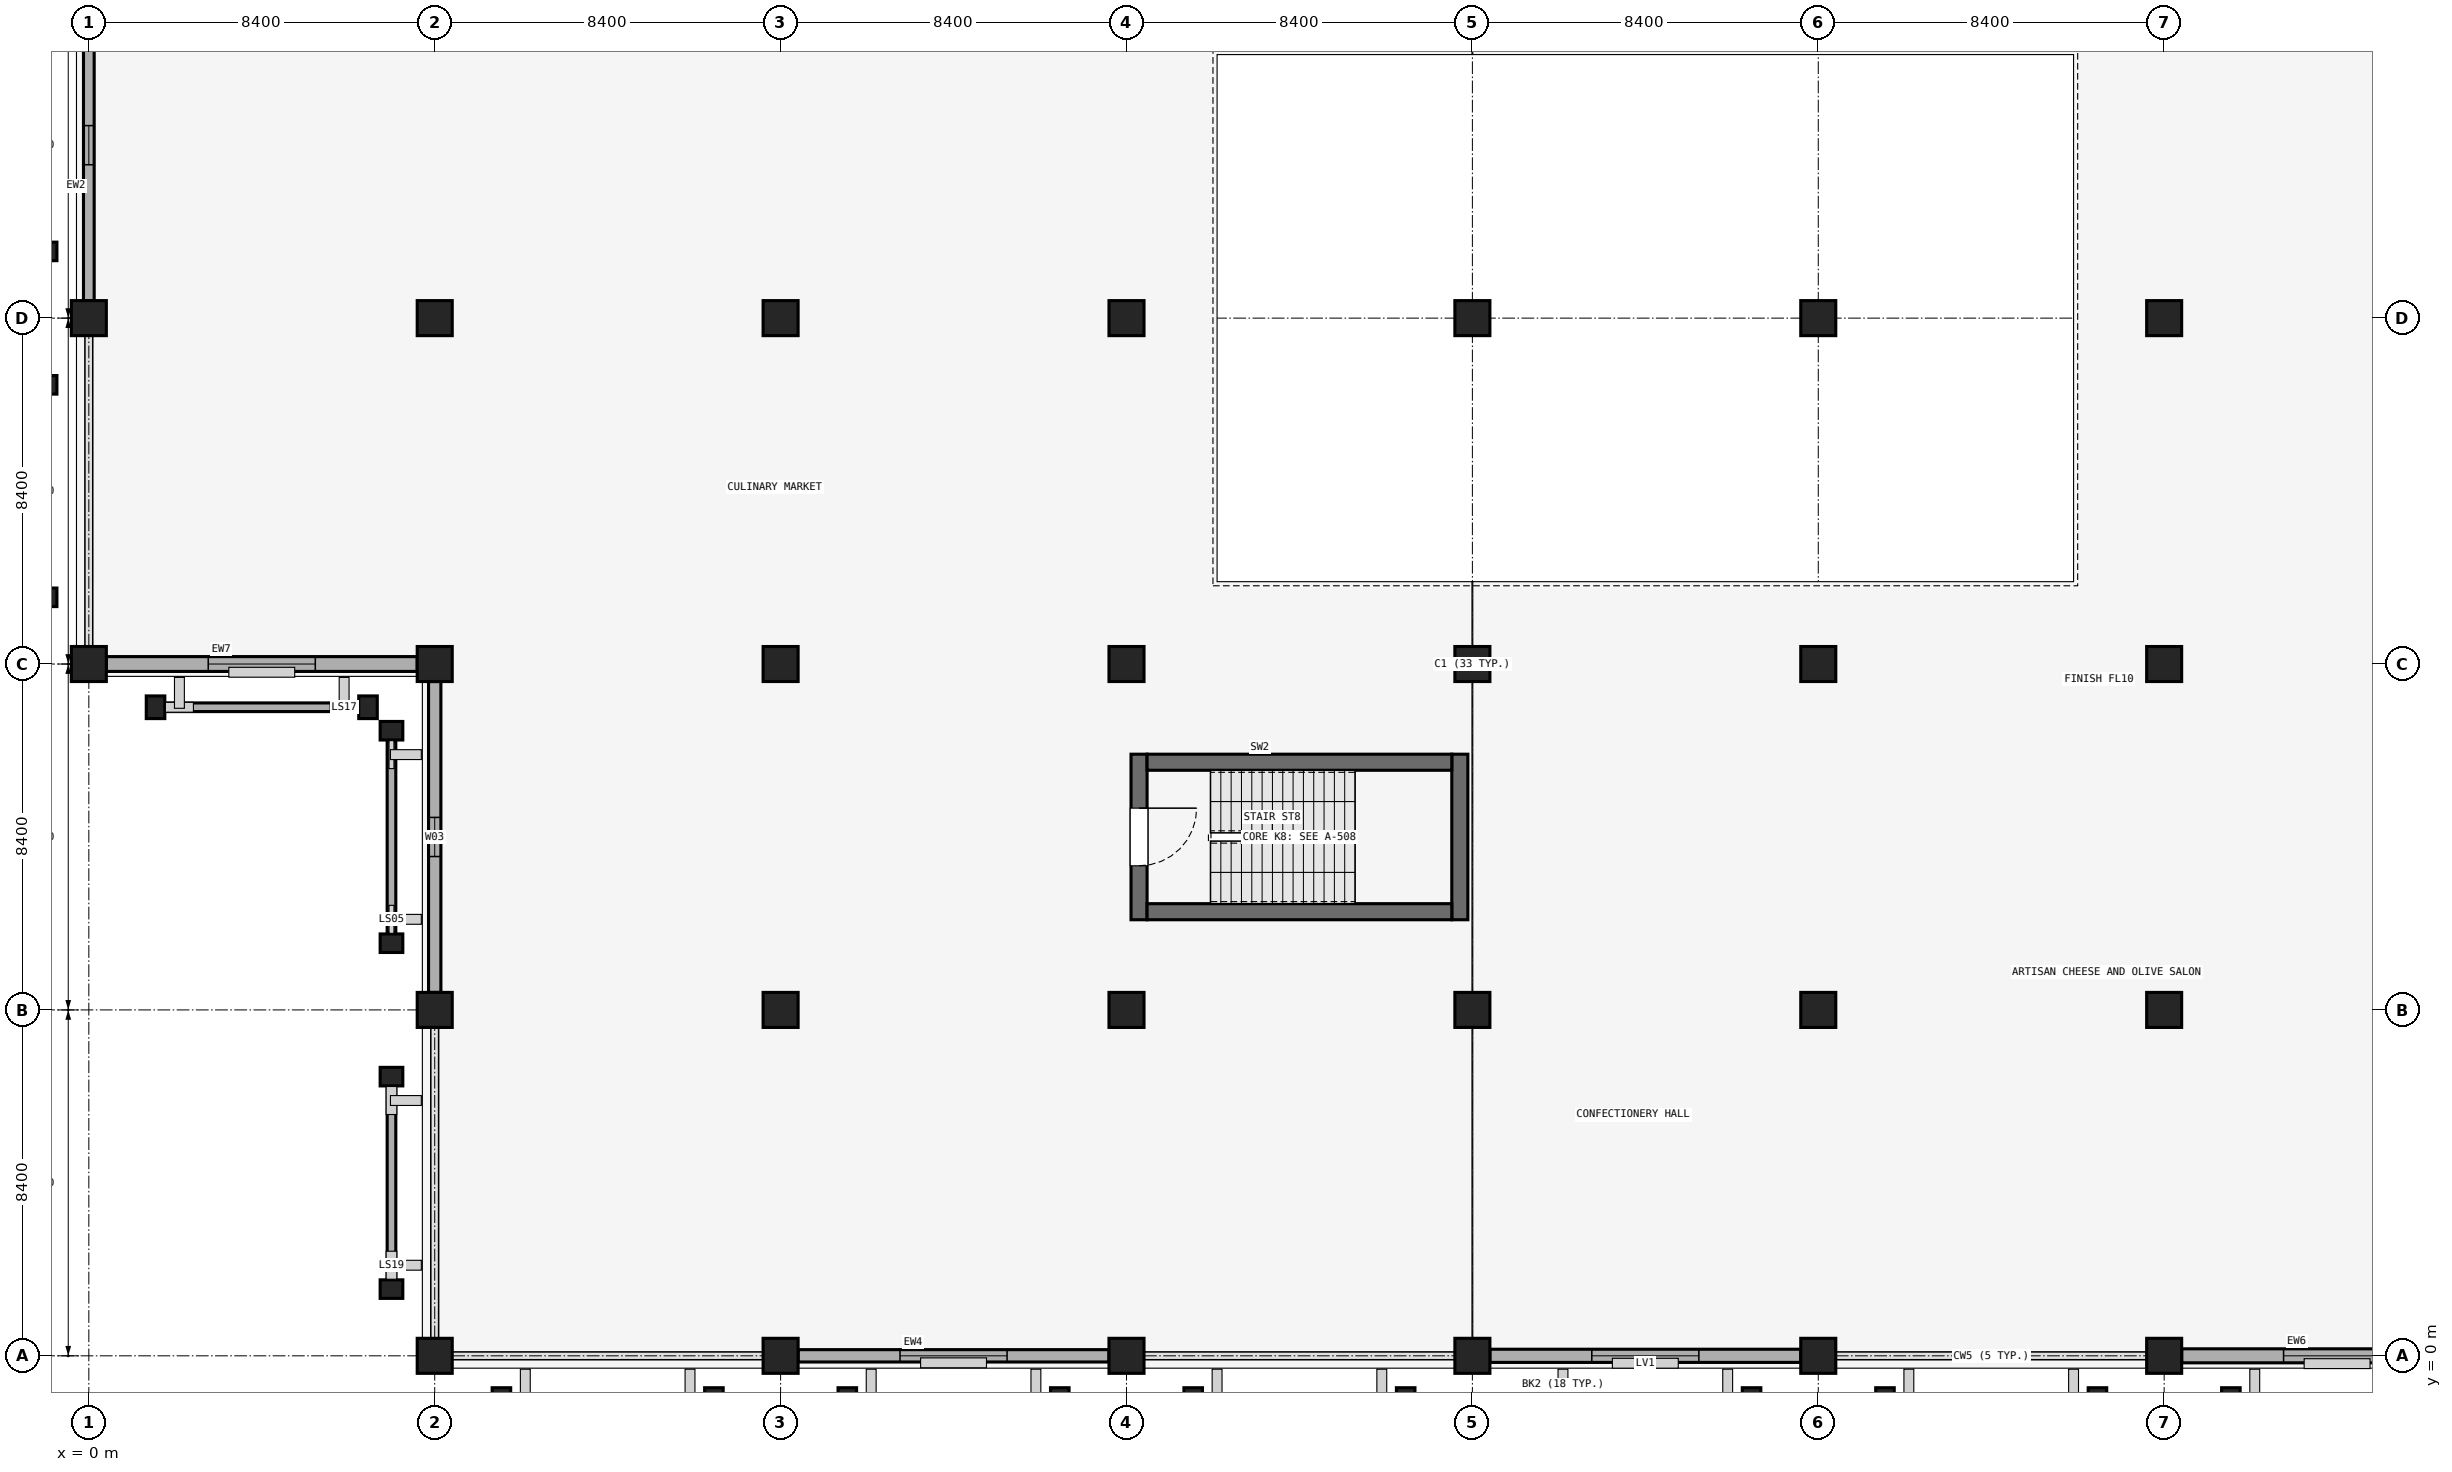
"""IFC4 building model, lengths in metres.
Left out: names, types, materials, properties, quantities, classifications, styles, units other than length and angle.
Written with IfcOpenShell. Run it as: python <this file> out.ifc"""

import sys

from ifc_helpers import new_model, si_unit, direction, frame, frame_2d, origin, origin_2d, place, context, subcontext, project, spatial, rectangle, extrude, element, fill, save


model = new_model("IFC4")
c1 = context("Model", 3, precision=1e-05, world=origin(), true_north=direction((0.0, 1.0)))
c2 = subcontext(c1, "Body", "Model", "MODEL_VIEW")
j1 = project(units=[si_unit("LENGTHUNIT", "METRE"), si_unit("PLANEANGLEUNIT", "RADIAN")], contexts=[c1])
p1 = place(None, origin())
s1 = spatial("IfcSite", under=j1, at=p1, CompositionType="ELEMENT")
p2 = place(p1, origin())
s2 = spatial("IfcBuilding", under=s1, at=p2, CompositionType="ELEMENT")
p3 = place(p2, frame((0.0, 0.0, 5.4)))
s3 = spatial("IfcBuildingStorey", under=s2, at=p3, CompositionType="ELEMENT", Elevation=5.4)
for number, where, z_axis, x_axis in (
    (1, (8.4, 0.0, 0.0), (0.0, 0.0, 1.0), (1.0, 0.0, 0.0)),
    (2, (16.8, 0.0, 0.0), (0.0, 0.0, 1.0), (1.0, 0.0, 0.0)),
    (3, (25.2, 0.0, 0.0), (0.0, 0.0, 1.0), (1.0, 0.0, 0.0)),
    (4, (33.6, 0.0, 0.0), (0.0, 0.0, 1.0), (1.0, 0.0, 0.0)),
    (5, (42.0, 0.0, 0.0), (0.0, 0.0, 1.0), (1.0, 0.0, 0.0)),
    (6, (50.4, 0.0, 0.0), (0.0, 0.0, 1.0), (1.0, 0.0, 0.0)),
    (7, (8.4, 8.4, 0.0), (0.0, 0.0, 1.0), (1.0, 0.0, 0.0)),
    (8, (16.8, 8.4, 0.0), (0.0, 0.0, 1.0), (1.0, 0.0, 0.0)),
    (9, (25.2, 8.4, 0.0), (0.0, 0.0, 1.0), (1.0, 0.0, 0.0)),
    (10, (33.6, 8.4, 0.0), (0.0, 0.0, 1.0), (1.0, 0.0, 0.0)),
    (11, (42.0, 8.4, 0.0), (0.0, 0.0, 1.0), (1.0, 0.0, 0.0)),
    (12, (50.4, 8.4, 0.0), (0.0, 0.0, 1.0), (1.0, 0.0, 0.0)),
    (13, (0.0, 16.8, 0.0), (0.0, 0.0, 1.0), (1.0, 0.0, 0.0)),
    (14, (8.4, 16.8, 0.0), (0.0, 0.0, 1.0), (1.0, 0.0, 0.0)),
    (15, (16.8, 16.8, 0.0), (0.0, 0.0, 1.0), (1.0, 0.0, 0.0)),
    (16, (25.2, 16.8, 0.0), (0.0, 0.0, 1.0), (1.0, 0.0, 0.0)),
    (17, (33.6, 16.8, 0.0), (0.0, 0.0, 1.0), (1.0, 0.0, 0.0)),
    (18, (42.0, 16.8, 0.0), (0.0, 0.0, 1.0), (1.0, 0.0, 0.0)),
    (19, (50.4, 16.8, 0.0), (0.0, 0.0, 1.0), (1.0, 0.0, 0.0)),
    (20, (0.0, 25.2, 0.0), (0.0, 0.0, 1.0), (1.0, 0.0, 0.0)),
    (21, (8.4, 25.2, 0.0), (0.0, 0.0, 1.0), (1.0, 0.0, 0.0)),
    (22, (16.8, 25.2, 0.0), (0.0, 0.0, 1.0), (1.0, 0.0, 0.0)),
    (23, (25.2, 25.2, 0.0), (0.0, 0.0, 1.0), (1.0, 0.0, 0.0)),
    (24, (33.6, 25.2, 0.0), (0.0, 0.0, 1.0), (1.0, 0.0, 0.0)),
    (25, (42.0, 25.2, 0.0), (0.0, 0.0, 1.0), (1.0, 0.0, 0.0)),
    (26, (50.4, 25.2, 0.0), (0.0, 0.0, 1.0), (1.0, 0.0, 0.0)),
):
    element("IfcColumn", number, at=place(p3, frame(where, z_axis=z_axis, x_axis=x_axis)), inside=s3, PredefinedType="COLUMN", context=c2, shape_type="SweptSolid", body=[
        extrude(rectangle(XDim=0.85, YDim=0.85, at=origin_2d()), origin(), (0.0, 0.0, 1.0), 4.5),
    ])
for number, where, z_axis, x_axis in (
    (27, (1.62, 15.75, 0.0), (0.0, 0.0, 1.0), (1.0, 0.0, 0.0)),
    (28, (6.78, 15.75, 0.0), (0.0, 0.0, 1.0), (1.0, 0.0, 0.0)),
    (29, (10.02, -1.05, 0.0), (0.0, 0.0, 1.0), (1.0, 0.0, 0.0)),
    (30, (15.18, -1.05, 0.0), (0.0, 0.0, 1.0), (1.0, 0.0, 0.0)),
    (31, (18.42, -1.05, 0.0), (0.0, 0.0, 1.0), (1.0, 0.0, 0.0)),
    (32, (23.58, -1.05, 0.0), (0.0, 0.0, 1.0), (1.0, 0.0, 0.0)),
    (33, (26.82, -1.05, 0.0), (0.0, 0.0, 1.0), (1.0, 0.0, 0.0)),
    (34, (31.98, -1.05, 0.0), (0.0, 0.0, 1.0), (1.0, 0.0, 0.0)),
    (35, (35.22, -1.05, 0.0), (0.0, 0.0, 1.0), (1.0, 0.0, 0.0)),
    (36, (40.38, -1.05, 0.0), (0.0, 0.0, 1.0), (1.0, 0.0, 0.0)),
    (37, (43.62, -1.05, 0.0), (0.0, 0.0, 1.0), (1.0, 0.0, 0.0)),
    (38, (48.78, -1.05, 0.0), (0.0, 0.0, 1.0), (1.0, 0.0, 0.0)),
    (39, (52.02, -1.05, 0.0), (0.0, 0.0, 1.0), (1.0, 0.0, 0.0)),
    (40, (-1.05, 18.42, 0.0), (0.0, 0.0, 1.0), (0.0, 1.0, 0.0)),
    (41, (-1.05, 23.58, 0.0), (0.0, 0.0, 1.0), (0.0, 1.0, 0.0)),
    (42, (-1.05, 26.82, 0.0), (0.0, 0.0, 1.0), (0.0, 1.0, 0.0)),
    (43, (7.35, 1.62, 0.0), (0.0, 0.0, 1.0), (0.0, 1.0, 0.0)),
    (44, (7.35, 6.78, 0.0), (0.0, 0.0, 1.0), (0.0, 1.0, 0.0)),
    (45, (7.35, 10.02, 0.0), (0.0, 0.0, 1.0), (0.0, 1.0, 0.0)),
    (46, (7.35, 15.18, 0.0), (0.0, 0.0, 1.0), (0.0, 1.0, 0.0)),
):
    element("IfcColumn", number, at=place(p3, frame(where, z_axis=z_axis, x_axis=x_axis)), inside=s3, PredefinedType="PILASTER", context=c2, shape_type="SweptSolid", body=[
        extrude(rectangle(XDim=0.45, YDim=0.55, at=origin_2d()), origin(), (0.0, 0.0, 1.0), 4.5),
    ])
p4 = place(p3, frame((17.225, 0.0, 0.0), z_axis=(0.0, 0.0, 1.0), x_axis=(1.0, 0.0, 0.0)))
e47 = element("IfcWall", 47, at=p4, inside=s3, PredefinedType="SOLIDWALL", context=c2, shape_type="SweptSolid", body=[
    extrude(rectangle(XDim=7.55, YDim=0.3, at=frame_2d((3.775, 0.0))), origin(), (0.0, 0.0, 1.0), 3.43),
])
p5 = place(p4, frame((2.475, 0.0, 0.95)))
e48 = element("IfcOpeningElement", 48, at=p5, cuts=e47, PredefinedType="OPENING", context=c2, shape_type="SweptSolid", body=[
    extrude(rectangle(XDim=2.6, YDim=1.35, at=frame_2d((1.3, 0.675))), frame((0.0, 0.16, 0.0), z_axis=(0.0, -1.0, 0.0), x_axis=(1.0, 0.0, 0.0)), (0.0, 0.0, 1.0), 0.32),
])
p6 = place(p3, frame((34.025, 0.0, 0.0), z_axis=(0.0, 0.0, 1.0), x_axis=(1.0, 0.0, 0.0)))
e49 = element("IfcWall", 49, at=p6, inside=s3, PredefinedType="SOLIDWALL", context=c2, shape_type="SweptSolid", body=[
    extrude(rectangle(XDim=7.55, YDim=0.32, at=frame_2d((3.775, 0.0))), origin(), (0.0, 0.0, 1.0), 3.43),
])
p7 = place(p6, frame((2.475, 0.0, 0.95)))
e50 = element("IfcOpeningElement", 50, at=p7, cuts=e49, PredefinedType="OPENING", context=c2, shape_type="SweptSolid", body=[
    extrude(rectangle(XDim=2.6, YDim=1.6, at=frame_2d((1.3, 0.8))), frame((0.0, 0.17, 0.0), z_axis=(0.0, -1.0, 0.0), x_axis=(1.0, 0.0, 0.0)), (0.0, 0.0, 1.0), 0.34),
])
p8 = place(p3, frame((50.825, 0.0, 0.0), z_axis=(0.0, 0.0, 1.0), x_axis=(1.0, 0.0, 0.0)))
e51 = element("IfcWall", 51, at=p8, inside=s3, PredefinedType="SOLIDWALL", context=c2, shape_type="SweptSolid", body=[
    extrude(rectangle(XDim=7.55, YDim=0.34, at=frame_2d((3.775, 0.0))), origin(), (0.0, 0.0, 1.0), 3.43),
])
p9 = place(p8, frame((2.475, 0.0, 0.95)))
e52 = element("IfcOpeningElement", 52, at=p9, cuts=e51, PredefinedType="OPENING", context=c2, shape_type="SweptSolid", body=[
    extrude(rectangle(XDim=2.6, YDim=1.85, at=frame_2d((1.3, 0.925))), frame((0.0, 0.18, 0.0), z_axis=(0.0, -1.0, 0.0), x_axis=(1.0, 0.0, 0.0)), (0.0, 0.0, 1.0), 0.36),
])
p10 = place(p3, frame((0.425, 16.8, 0.0), z_axis=(0.0, 0.0, 1.0), x_axis=(1.0, 0.0, 0.0)))
e53 = element("IfcWall", 53, at=p10, inside=s3, PredefinedType="SOLIDWALL", context=c2, shape_type="SweptSolid", body=[
    extrude(rectangle(XDim=7.55, YDim=0.36, at=frame_2d((3.775, 0.0))), origin(), (0.0, 0.0, 1.0), 3.43),
])
p11 = place(p10, frame((2.475, 0.0, 0.95)))
e54 = element("IfcOpeningElement", 54, at=p11, cuts=e53, PredefinedType="OPENING", context=c2, shape_type="SweptSolid", body=[
    extrude(rectangle(XDim=2.6, YDim=2.1, at=frame_2d((1.3, 1.05))), frame((0.0, 0.19, 0.0), z_axis=(0.0, -1.0, 0.0), x_axis=(1.0, 0.0, 0.0)), (0.0, 0.0, 1.0), 0.38),
])
p12 = place(p3, frame((0.0, 25.625, 0.0), z_axis=(0.0, 0.0, 1.0), x_axis=(0.0, 1.0, 0.0)))
e55 = element("IfcWall", 55, at=p12, inside=s3, PredefinedType="SOLIDWALL", context=c2, shape_type="SweptSolid", body=[
    extrude(rectangle(XDim=7.55, YDim=0.26, at=frame_2d((3.775, 0.0))), origin(), (0.0, 0.0, 1.0), 3.43),
])
p13 = place(p12, frame((3.3, 0.0, 0.95)))
e56 = element("IfcOpeningElement", 56, at=p13, cuts=e55, PredefinedType="OPENING", context=c2, shape_type="SweptSolid", body=[
    extrude(rectangle(XDim=0.95, YDim=1.35, at=frame_2d((0.475, 0.675))), frame((0.0, 0.14, 0.0), z_axis=(0.0, -1.0, 0.0), x_axis=(1.0, 0.0, 0.0)), (0.0, 0.0, 1.0), 0.28),
])
p14 = place(p3, frame((8.4, 8.825, 0.0), z_axis=(0.0, 0.0, 1.0), x_axis=(0.0, 1.0, 0.0)))
e57 = element("IfcWall", 57, at=p14, inside=s3, PredefinedType="SOLIDWALL", context=c2, shape_type="SweptSolid", body=[
    extrude(rectangle(XDim=7.55, YDim=0.3, at=frame_2d((3.775, 0.0))), origin(), (0.0, 0.0, 1.0), 3.43),
])
p15 = place(p14, frame((3.3, 0.0, 0.95)))
e58 = element("IfcOpeningElement", 58, at=p15, cuts=e57, PredefinedType="OPENING", context=c2, shape_type="SweptSolid", body=[
    extrude(rectangle(XDim=0.95, YDim=1.85, at=frame_2d((0.475, 0.925))), frame((0.0, 0.16, 0.0), z_axis=(0.0, -1.0, 0.0), x_axis=(1.0, 0.0, 0.0)), (0.0, 0.0, 1.0), 0.32),
])
for number, where, z_axis, x_axis in (
    (59, (1.87, 15.75, 3.88), (0.0, 0.0, 1.0), (1.0, 0.0, 0.0)),
    (60, (7.35, 1.87, 3.88), (0.0, 0.0, 1.0), (0.0, 1.0, 0.0)),
    (61, (7.35, 10.27, 3.88), (0.0, 0.0, 1.0), (0.0, 1.0, 0.0)),
):
    element("IfcWall", number, at=place(p3, frame(where, z_axis=z_axis, x_axis=x_axis)), inside=s3, PredefinedType="PARAPET", context=c2, shape_type="SweptSolid", body=[
        extrude(rectangle(XDim=4.66, YDim=0.21, at=frame_2d((2.33, 0.0))), origin(), (0.0, 0.0, 1.0), 0.12),
    ])
p16 = place(p3, frame((25.505, 14.61, 0.0), z_axis=(0.0, 0.0, 1.0), x_axis=(0.0, -1.0, 0.0)))
e62 = element("IfcWall", 62, at=p16, inside=s3, PredefinedType="SHEAR", context=c2, shape_type="SweptSolid", body=[
    extrude(rectangle(XDim=4.02, YDim=0.39, at=frame_2d((2.01, 0.0))), origin(), (0.0, 0.0, 1.0), 4.18),
])
p17 = place(p16, frame((1.31, 0.0, 0.0)))
e63 = element("IfcOpeningElement", 63, at=p17, cuts=e62, PredefinedType="OPENING", context=c2, shape_type="SweptSolid", body=[
    extrude(rectangle(XDim=1.4, YDim=2.15, at=frame_2d((0.7, 1.075))), frame((0.0, 0.205, 0.0), z_axis=(0.0, -1.0, 0.0), x_axis=(1.0, 0.0, 0.0)), (0.0, 0.0, 1.0), 0.41),
])
p18 = place(p3, frame((33.295, 10.59, 0.0), z_axis=(0.0, 0.0, 1.0), x_axis=(0.0, 1.0, 0.0)))
e64 = element("IfcWall", 64, at=p18, inside=s3, PredefinedType="SHEAR", context=c2, shape_type="SweptSolid", body=[
    extrude(rectangle(XDim=4.02, YDim=0.39, at=frame_2d((2.01, 0.0))), origin(), (0.0, 0.0, 1.0), 4.18),
])
for number, where, z_axis, x_axis in (
    (65, (25.7, 10.785, 0.0), (0.0, 0.0, 1.0), (1.0, 0.0, 0.0)),
    (66, (25.7, 14.415, 0.0), (0.0, 0.0, 1.0), (1.0, 0.0, 0.0)),
):
    element("IfcWall", number, at=place(p3, frame(where, z_axis=z_axis, x_axis=x_axis)), inside=s3, PredefinedType="SHEAR", context=c2, shape_type="SweptSolid", body=[
        extrude(rectangle(XDim=7.4, YDim=0.39, at=frame_2d((3.7, 0.0))), origin(), (0.0, 0.0, 1.0), 4.18),
    ])
p19 = place(p5, origin())
e67 = element("IfcWindow", 67, at=p19, inside=s3, PartitioningType="DOUBLE_PANEL_VERTICAL", PredefinedType="WINDOW", context=c2, shape_type="SweptSolid", body=[
    extrude(rectangle(XDim=2.6, YDim=1.35, at=frame_2d((1.3, 0.675))), frame((0.0, 0.03, 0.0), z_axis=(0.0, -1.0, 0.0), x_axis=(1.0, 0.0, 0.0)), (0.0, 0.0, 1.0), 0.06),
])
fill(e48, e67)
p20 = place(p7, origin())
e68 = element("IfcWindow", 68, at=p20, inside=s3, PartitioningType="DOUBLE_PANEL_VERTICAL", PredefinedType="WINDOW", context=c2, shape_type="SweptSolid", body=[
    extrude(rectangle(XDim=2.6, YDim=1.6, at=frame_2d((1.3, 0.8))), frame((0.0, 0.03, 0.0), z_axis=(0.0, -1.0, 0.0), x_axis=(1.0, 0.0, 0.0)), (0.0, 0.0, 1.0), 0.06),
])
fill(e50, e68)
p21 = place(p9, origin())
e69 = element("IfcWindow", 69, at=p21, inside=s3, PartitioningType="DOUBLE_PANEL_VERTICAL", PredefinedType="WINDOW", context=c2, shape_type="SweptSolid", body=[
    extrude(rectangle(XDim=2.6, YDim=1.85, at=frame_2d((1.3, 0.925))), frame((0.0, 0.03, 0.0), z_axis=(0.0, -1.0, 0.0), x_axis=(1.0, 0.0, 0.0)), (0.0, 0.0, 1.0), 0.06),
])
fill(e52, e69)
p22 = place(p11, origin())
e70 = element("IfcWindow", 70, at=p22, inside=s3, PartitioningType="DOUBLE_PANEL_VERTICAL", PredefinedType="WINDOW", context=c2, shape_type="SweptSolid", body=[
    extrude(rectangle(XDim=2.6, YDim=2.1, at=frame_2d((1.3, 1.05))), frame((0.0, 0.03, 0.0), z_axis=(0.0, -1.0, 0.0), x_axis=(1.0, 0.0, 0.0)), (0.0, 0.0, 1.0), 0.06),
])
fill(e54, e70)
p23 = place(p13, origin())
e71 = element("IfcWindow", 71, at=p23, inside=s3, PartitioningType="SINGLE_PANEL", PredefinedType="WINDOW", context=c2, shape_type="SweptSolid", body=[
    extrude(rectangle(XDim=0.95, YDim=1.35, at=frame_2d((0.475, 0.675))), frame((0.0, 0.03, 0.0), z_axis=(0.0, -1.0, 0.0), x_axis=(1.0, 0.0, 0.0)), (0.0, 0.0, 1.0), 0.06),
])
fill(e56, e71)
p24 = place(p15, origin())
e72 = element("IfcWindow", 72, at=p24, inside=s3, PartitioningType="SINGLE_PANEL", PredefinedType="WINDOW", context=c2, shape_type="SweptSolid", body=[
    extrude(rectangle(XDim=0.95, YDim=1.85, at=frame_2d((0.475, 0.925))), frame((0.0, 0.03, 0.0), z_axis=(0.0, -1.0, 0.0), x_axis=(1.0, 0.0, 0.0)), (0.0, 0.0, 1.0), 0.06),
])
fill(e58, e72)
p25 = place(p17, origin())
e73 = element("IfcDoor", 73, at=p25, inside=s3, OperationType="SINGLE_SWING_LEFT", PredefinedType="DOOR", context=c2, shape_type="SweptSolid", body=[
    extrude(rectangle(XDim=1.4, YDim=2.15, at=frame_2d((0.7, 1.075))), frame((0.0, 0.025, 0.0), z_axis=(0.0, -1.0, 0.0), x_axis=(1.0, 0.0, 0.0)), (0.0, 0.0, 1.0), 0.05),
])
fill(e63, e73)
save(model, sys.argv[1])
